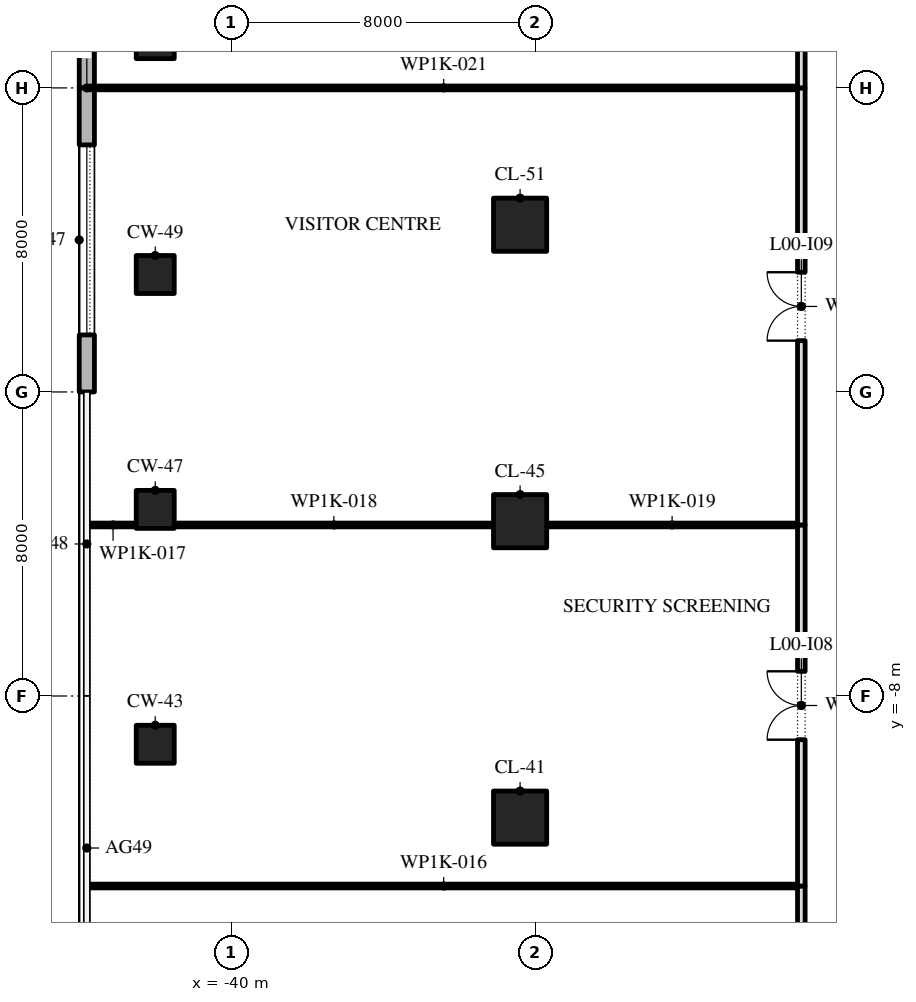
"""IFC4 building model, lengths in metres.
Left out: names, types, materials, properties, quantities, classifications, styles, units other than length and angle.
Written with IfcOpenShell. Run it as: python <this file> out.ifc"""

import sys

from ifc_helpers import new_model, si_unit, direction, frame, frame_2d, origin, origin_2d, place, context, subcontext, project, spatial, polyline, rectangle, outline, extrude, element, fill, save


model = new_model("IFC4")
c1 = context("Model", 3, precision=1e-05, world=origin(), true_north=direction((0.0, 1.0)))
c2 = subcontext(c1, "Body", "Model", "MODEL_VIEW")
j1 = project(units=[si_unit("LENGTHUNIT", "METRE"), si_unit("PLANEANGLEUNIT", "RADIAN")], contexts=[c1])
p1 = place(None, origin())
s1 = spatial("IfcSite", under=j1, at=p1, CompositionType="ELEMENT")
p2 = place(p1, origin())
s2 = spatial("IfcBuilding", under=s1, at=p2, CompositionType="ELEMENT")
p3 = place(p2, origin())
s3 = spatial("IfcBuildingStorey", under=s2, at=p3, CompositionType="ELEMENT", Elevation=0.0)
p4 = place(p3, frame((-32.4, -11.2, 0.0), z_axis=(0.0, 0.0, 1.0), x_axis=(1.0, 0.0, 0.0)))
e1 = element("IfcColumn", 1, at=p4, inside=s3, PredefinedType="COLUMN", context=c2, shape_type="SweptSolid", body=[
    extrude(rectangle(XDim=1.4, YDim=1.4, at=origin_2d()), origin(), (0.0, 0.0, 1.0), 8.0),
])
p5 = place(p3, frame((-42.0, -9.27, 0.0), z_axis=(0.0, 0.0, 1.0), x_axis=(1.0, 0.0, 0.0)))
e2 = element("IfcColumn", 2, at=p5, inside=s3, PredefinedType="COLUMN", context=c2, shape_type="SweptSolid", body=[
    extrude(rectangle(XDim=1.0, YDim=1.0, at=origin_2d()), origin(), (0.0, 0.0, 1.0), 8.0),
])
p6 = place(p3, frame((-32.4, -3.4, 0.0), z_axis=(0.0, 0.0, 1.0), x_axis=(1.0, 0.0, 0.0)))
e3 = element("IfcColumn", 3, at=p6, inside=s3, PredefinedType="COLUMN", context=c2, shape_type="SweptSolid", body=[
    extrude(rectangle(XDim=1.4, YDim=1.4, at=origin_2d()), origin(), (0.0, 0.0, 1.0), 8.0),
])
for number, where, z_axis, x_axis in (
    (4, (-42.0, -3.09, 0.0), (0.0, 0.0, 1.0), (1.0, 0.0, 0.0)),
    (5, (-42.0, 3.09, 0.0), (0.0, 0.0, 1.0), (1.0, 0.0, 0.0)),
):
    element("IfcColumn", number, at=place(p3, frame(where, z_axis=z_axis, x_axis=x_axis)), inside=s3, PredefinedType="COLUMN", context=c2, shape_type="SweptSolid", body=[
        extrude(rectangle(XDim=1.0, YDim=1.0, at=origin_2d()), origin(), (0.0, 0.0, 1.0), 8.0),
    ])
p7 = place(p3, frame((-32.4, 4.4, 0.0), z_axis=(0.0, 0.0, 1.0), x_axis=(1.0, 0.0, 0.0)))
e6 = element("IfcColumn", 6, at=p7, inside=s3, PredefinedType="COLUMN", context=c2, shape_type="SweptSolid", body=[
    extrude(rectangle(XDim=1.4, YDim=1.4, at=origin_2d()), origin(), (0.0, 0.0, 1.0), 8.0),
])
p8 = place(p3, frame((-42.0, 9.27, 0.0), z_axis=(0.0, 0.0, 1.0), x_axis=(1.0, 0.0, 0.0)))
e7 = element("IfcColumn", 7, at=p8, inside=s3, PredefinedType="COLUMN", context=c2, shape_type="SweptSolid", body=[
    extrude(rectangle(XDim=1.0, YDim=1.0, at=origin_2d()), origin(), (0.0, 0.0, 1.0), 8.0),
])
p9 = place(p3, frame((-43.8, 16.0, 0.0), z_axis=(0.0, 0.0, 1.0), x_axis=(0.0, -1.0, 0.0)))
e8 = element("IfcWall", 8, at=p9, inside=s3, PredefinedType="STANDARD", context=c2, shape_type="SweptSolid", body=[
    extrude(rectangle(XDim=8.0, YDim=0.4, at=frame_2d((4.0, 0.0))), origin(), (0.0, 0.0, 1.0), 7.7),
])
p10 = place(p9, frame((1.5, 0.0, 0.5)))
e9 = element("IfcOpeningElement", 9, at=p10, cuts=e8, PredefinedType="OPENING", context=c2, shape_type="SweptSolid", body=[
    extrude(outline(polyline([(0.0, 0.0), (5.0, 0.0), (5.0, 3.35), (4.955, 3.907), (4.822, 4.451), (4.604, 4.966), (4.306, 5.44), (3.937, 5.86), (3.505, 6.216), (3.022, 6.498), (2.5, 6.7), (1.978, 6.498), (1.495, 6.216), (1.063, 5.86), (0.694, 5.44), (0.396, 4.966), (0.178, 4.451), (0.045, 3.907), (0.0, 3.35), (0.0, 0.0)])), frame((0.0, 0.21, 0.0), z_axis=(0.0, -1.0, 0.0), x_axis=(1.0, 0.0, 0.0)), (0.0, 0.0, 1.0), 0.42),
])
p11 = place(p3, frame((-43.8, 8.0, 0.0), z_axis=(0.0, 0.0, 1.0), x_axis=(0.0, -1.0, 0.0)))
e10 = element("IfcWall", 10, at=p11, inside=s3, PredefinedType="STANDARD", context=c2, shape_type="SweptSolid", body=[
    extrude(rectangle(XDim=8.0, YDim=0.4, at=frame_2d((4.0, 0.0))), origin(), (0.0, 0.0, 1.0), 7.7),
])
p12 = place(p11, frame((1.5, 0.0, 0.5)))
e11 = element("IfcOpeningElement", 11, at=p12, cuts=e10, PredefinedType="OPENING", context=c2, shape_type="SweptSolid", body=[
    extrude(outline(polyline([(0.0, 0.0), (5.0, 0.0), (5.0, 3.35), (4.955, 3.907), (4.822, 4.451), (4.604, 4.966), (4.306, 5.44), (3.937, 5.86), (3.505, 6.216), (3.022, 6.498), (2.5, 6.7), (1.978, 6.498), (1.495, 6.216), (1.063, 5.86), (0.694, 5.44), (0.396, 4.966), (0.178, 4.451), (0.045, 3.907), (0.0, 3.35), (0.0, 0.0)])), frame((0.0, 0.21, 0.0), z_axis=(0.0, -1.0, 0.0), x_axis=(1.0, 0.0, 0.0)), (0.0, 0.0, 1.0), 0.42),
])
p13 = place(p3, frame((-43.72, -13.0, 0.0), z_axis=(0.0, 0.0, 1.0), x_axis=(1.0, 0.0, 0.0)))
e12 = element("IfcWall", 12, at=p13, inside=s3, PredefinedType="PARTITIONING", context=c2, shape_type="SweptSolid", body=[
    extrude(rectangle(XDim=18.62, YDim=0.1, at=frame_2d((9.31, 0.0))), origin(), (0.0, 0.0, 1.0), 7.7),
])
p14 = place(p3, frame((-43.72, -3.5, 0.0), z_axis=(0.0, 0.0, 1.0), x_axis=(1.0, 0.0, 0.0)))
e13 = element("IfcWall", 13, at=p14, inside=s3, PredefinedType="PARTITIONING", context=c2, shape_type="SweptSolid", body=[
    extrude(rectangle(XDim=1.22, YDim=0.1, at=frame_2d((0.61, 0.0))), origin(), (0.0, 0.0, 1.0), 7.7),
])
p15 = place(p3, frame((-41.5, -3.5, 0.0), z_axis=(0.0, 0.0, 1.0), x_axis=(1.0, 0.0, 0.0)))
e14 = element("IfcWall", 14, at=p15, inside=s3, PredefinedType="PARTITIONING", context=c2, shape_type="SweptSolid", body=[
    extrude(rectangle(XDim=8.4, YDim=0.1, at=frame_2d((4.2, 0.0))), origin(), (0.0, 0.0, 1.0), 7.7),
])
p16 = place(p3, frame((-31.7, -3.5, 0.0), z_axis=(0.0, 0.0, 1.0), x_axis=(1.0, 0.0, 0.0)))
e15 = element("IfcWall", 15, at=p16, inside=s3, PredefinedType="PARTITIONING", context=c2, shape_type="SweptSolid", body=[
    extrude(rectangle(XDim=6.6, YDim=0.1, at=frame_2d((3.3, 0.0))), origin(), (0.0, 0.0, 1.0), 7.7),
])
p17 = place(p3, frame((-43.72, 8.0, 0.0), z_axis=(0.0, 0.0, 1.0), x_axis=(1.0, 0.0, 0.0)))
e16 = element("IfcWall", 16, at=p17, inside=s3, PredefinedType="PARTITIONING", context=c2, shape_type="SweptSolid", body=[
    extrude(rectangle(XDim=18.62, YDim=0.1, at=frame_2d((9.31, 0.0))), origin(), (0.0, 0.0, 1.0), 7.7),
])
p18 = place(p3, frame((-25.0, -28.4, 0.0), z_axis=(0.0, 0.0, 1.0), x_axis=(0.0, 1.0, 0.0)))
e17 = element("IfcWall", 17, at=p18, inside=s3, PredefinedType="PARTITIONING", context=c2, shape_type="SweptSolid", body=[
    extrude(rectangle(XDim=15.4, YDim=0.2, at=frame_2d((7.7, 0.0))), origin(), (0.0, 0.0, 1.0), 7.7),
])
p19 = place(p18, frame((6.8, 0.0, 0.0)))
e18 = element("IfcOpeningElement", 18, at=p19, cuts=e17, PredefinedType="OPENING", context=c2, shape_type="SweptSolid", body=[
    extrude(rectangle(XDim=1.8, YDim=2.1, at=frame_2d((0.9, 1.05))), frame((0.0, 0.11, 0.0), z_axis=(0.0, -1.0, 0.0), x_axis=(1.0, 0.0, 0.0)), (0.0, 0.0, 1.0), 0.22),
])
p20 = place(p3, frame((-25.0, -13.0, 0.0), z_axis=(0.0, 0.0, 1.0), x_axis=(0.0, 1.0, 0.0)))
e19 = element("IfcWall", 19, at=p20, inside=s3, PredefinedType="PARTITIONING", context=c2, shape_type="SweptSolid", body=[
    extrude(rectangle(XDim=9.5, YDim=0.2, at=frame_2d((4.75, 0.0))), origin(), (0.0, 0.0, 1.0), 7.7),
])
p21 = place(p20, frame((3.85, 0.0, 0.0)))
e20 = element("IfcOpeningElement", 20, at=p21, cuts=e19, PredefinedType="OPENING", context=c2, shape_type="SweptSolid", body=[
    extrude(rectangle(XDim=1.8, YDim=2.1, at=frame_2d((0.9, 1.05))), frame((0.0, 0.11, 0.0), z_axis=(0.0, -1.0, 0.0), x_axis=(1.0, 0.0, 0.0)), (0.0, 0.0, 1.0), 0.22),
])
p22 = place(p3, frame((-25.0, -3.5, 0.0), z_axis=(0.0, 0.0, 1.0), x_axis=(0.0, 1.0, 0.0)))
e21 = element("IfcWall", 21, at=p22, inside=s3, PredefinedType="PARTITIONING", context=c2, shape_type="SweptSolid", body=[
    extrude(rectangle(XDim=11.5, YDim=0.2, at=frame_2d((5.75, 0.0))), origin(), (0.0, 0.0, 1.0), 7.7),
])
p23 = place(p22, frame((4.85, 0.0, 0.0)))
e22 = element("IfcOpeningElement", 22, at=p23, cuts=e21, PredefinedType="OPENING", context=c2, shape_type="SweptSolid", body=[
    extrude(rectangle(XDim=1.8, YDim=2.1, at=frame_2d((0.9, 1.05))), frame((0.0, 0.11, 0.0), z_axis=(0.0, -1.0, 0.0), x_axis=(1.0, 0.0, 0.0)), (0.0, 0.0, 1.0), 0.22),
])
p24 = place(p3, frame((-25.0, 8.0, 0.0), z_axis=(0.0, 0.0, 1.0), x_axis=(0.0, 1.0, 0.0)))
e23 = element("IfcWall", 23, at=p24, inside=s3, PredefinedType="PARTITIONING", context=c2, shape_type="SweptSolid", body=[
    extrude(rectangle(XDim=10.5, YDim=0.2, at=frame_2d((5.25, 0.0))), origin(), (0.0, 0.0, 1.0), 7.7),
])
p25 = place(p24, frame((4.35, 0.0, 0.0)))
e24 = element("IfcOpeningElement", 24, at=p25, cuts=e23, PredefinedType="OPENING", context=c2, shape_type="SweptSolid", body=[
    extrude(rectangle(XDim=1.8, YDim=2.1, at=frame_2d((0.9, 1.05))), frame((0.0, 0.11, 0.0), z_axis=(0.0, -1.0, 0.0), x_axis=(1.0, 0.0, 0.0)), (0.0, 0.0, 1.0), 0.22),
])
p26 = place(p12, origin())
e25 = element("IfcWindow", 25, at=p26, inside=s3, PartitioningType="DOUBLE_PANEL_VERTICAL", PredefinedType="WINDOW", context=c2, shape_type="SweptSolid", body=[
    extrude(outline(polyline([(0.0, 0.0), (5.0, 0.0), (5.0, 3.35), (4.955, 3.907), (4.822, 4.451), (4.604, 4.966), (4.306, 5.44), (3.937, 5.86), (3.505, 6.216), (3.022, 6.498), (2.5, 6.7), (1.978, 6.498), (1.495, 6.216), (1.063, 5.86), (0.694, 5.44), (0.396, 4.966), (0.178, 4.451), (0.045, 3.907), (0.0, 3.35), (0.0, 0.0)])), frame((0.0, 0.03, 0.0), z_axis=(0.0, -1.0, 0.0), x_axis=(1.0, 0.0, 0.0)), (0.0, 0.0, 1.0), 0.06),
])
fill(e11, e25)
p27 = place(p21, origin())
e26 = element("IfcDoor", 26, at=p27, inside=s3, OperationType="SINGLE_SWING_LEFT", PredefinedType="DOOR", context=c2, shape_type="SweptSolid", body=[
    extrude(rectangle(XDim=1.8, YDim=2.1, at=frame_2d((0.9, 1.05))), frame((0.0, 0.025, 0.0), z_axis=(0.0, -1.0, 0.0), x_axis=(1.0, 0.0, 0.0)), (0.0, 0.0, 1.0), 0.05),
])
fill(e20, e26)
p28 = place(p23, origin())
e27 = element("IfcDoor", 27, at=p28, inside=s3, OperationType="SINGLE_SWING_LEFT", PredefinedType="DOOR", context=c2, shape_type="SweptSolid", body=[
    extrude(rectangle(XDim=1.8, YDim=2.1, at=frame_2d((0.9, 1.05))), frame((0.0, 0.025, 0.0), z_axis=(0.0, -1.0, 0.0), x_axis=(1.0, 0.0, 0.0)), (0.0, 0.0, 1.0), 0.05),
])
fill(e22, e27)
save(model, sys.argv[1])
